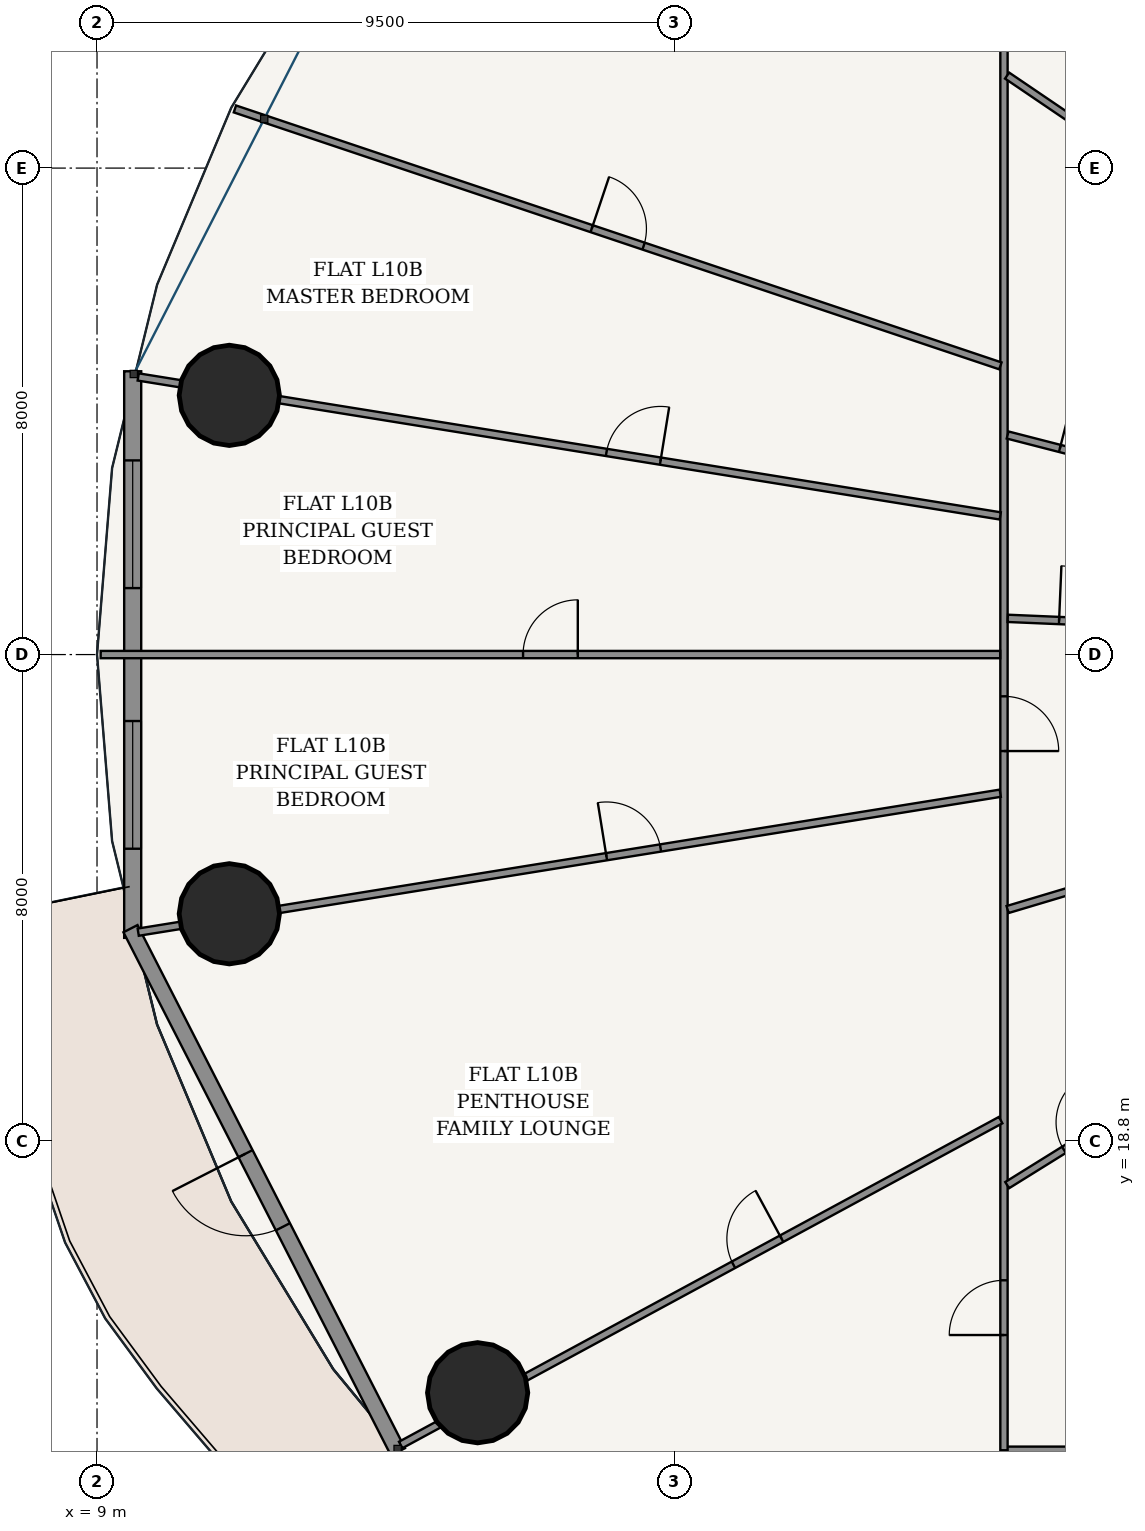
"""IFC4 building model, lengths in metres.
Left out: names, types, materials, properties, quantities, classifications, styles, units other than length and angle.
Written with IfcOpenShell. Run it as: python <this file> out.ifc"""

import sys

from ifc_helpers import new_model, si_unit, direction, frame, frame_2d, origin, origin_2d, place, context, subcontext, project, spatial, rectangle, hollow_circle, extrude, source, transform, mapped, element, fill, save


model = new_model("IFC4")
c1 = context("Model", 3, precision=1e-05, world=origin(), true_north=direction((-0.2419218956, 0.970295726276)))
c2 = subcontext(c1, "Body", "Model", "MODEL_VIEW")
j1 = project(units=[si_unit("LENGTHUNIT", "METRE"), si_unit("PLANEANGLEUNIT", "RADIAN")], contexts=[c1])
p1 = place(None, origin())
s1 = spatial("IfcSite", under=j1, at=p1, CompositionType="ELEMENT")
p2 = place(p1, origin())
s2 = spatial("IfcBuilding", under=s1, at=p2, CompositionType="ELEMENT")
p3 = place(p2, frame((0.0, 0.0, 42.0)))
s3 = spatial("IfcBuildingStorey", under=s2, at=p3, CompositionType="ELEMENT", Elevation=42.0)
for number, where, z_axis, x_axis in (
    (1, (11.176, 31.063, 0.0), (0.0, 0.0, 1.0), (1.0, 0.0, 0.0)),
    (2, (11.176, 22.537, 0.0), (0.0, 0.0, 1.0), (1.0, 0.0, 0.0)),
    (3, (15.259, 14.661, 0.0), (0.0, 0.0, 1.0), (1.0, 0.0, 0.0)),
):
    element("IfcColumn", number, at=place(p3, frame(where, z_axis=z_axis, x_axis=x_axis)), inside=s3, PredefinedType="COLUMN", context=c2, shape_type="SweptSolid", body=[
        extrude(hollow_circle(Radius=0.825, WallThickness=0.05, at=origin_2d()), origin(), (0.0, 0.0, 1.0), 3.6),
    ])
p4 = place(p3, frame((9.587, 31.459, 0.0), z_axis=(0.0, 0.0, 1.0), x_axis=(0.0, -1.0, 0.0)))
e4 = element("IfcWall", 4, at=p4, inside=s3, PredefinedType="SOLIDWALL", context=c2, shape_type="SweptSolid", body=[
    extrude(rectangle(XDim=9.318, YDim=0.28, at=frame_2d((4.659, 0.0))), origin(), (0.0, 0.0, 1.0), 3.32),
])
p5 = place(p4, frame((1.466, 0.0, 0.85)))
e5 = element("IfcOpeningElement", 5, at=p5, cuts=e4, PredefinedType="OPENING", context=c2, shape_type="SweptSolid", body=[
    extrude(rectangle(XDim=2.1, YDim=1.95, at=frame_2d((1.05, 0.975))), frame((0.0, 0.15, 0.0), z_axis=(0.0, -1.0, 0.0), x_axis=(1.0, 0.0, 0.0)), (0.0, 0.0, 1.0), 0.3),
])
p6 = place(p4, frame((5.752, 0.0, 0.85)))
e6 = element("IfcOpeningElement", 6, at=p6, cuts=e4, PredefinedType="OPENING", context=c2, shape_type="SweptSolid", body=[
    extrude(rectangle(XDim=2.1, YDim=1.95, at=frame_2d((1.05, 0.975))), frame((0.0, 0.15, 0.0), z_axis=(0.0, -1.0, 0.0), x_axis=(1.0, 0.0, 0.0)), (0.0, 0.0, 1.0), 0.3),
])
p7 = place(p3, frame((9.55, 22.292, 0.0), z_axis=(0.0, 0.0, 1.0), x_axis=(0.455220575541, -0.890378698984, 0.0)))
e7 = element("IfcWall", 7, at=p7, inside=s3, PredefinedType="SOLIDWALL", context=c2, shape_type="SweptSolid", body=[
    extrude(rectangle(XDim=9.662, YDim=0.26, at=frame_2d((4.831, 0.0))), origin(), (0.0, 0.0, 1.0), 3.32),
])
p8 = place(p7, frame((4.156, 0.0, 0.0)))
e8 = element("IfcOpeningElement", 8, at=p8, cuts=e7, PredefinedType="OPENING", context=c2, shape_type="SweptSolid", body=[
    extrude(rectangle(XDim=1.35, YDim=2.2, at=frame_2d((0.675, 1.1))), frame((0.0, 0.14, 0.0), z_axis=(0.0, -1.0, 0.0), x_axis=(1.0, 0.0, 0.0)), (0.0, 0.0, 1.0), 0.28),
])
p9 = place(p3, frame((27.109, 13.715, 0.0), z_axis=(0.0, 0.0, 1.0), x_axis=(-1.0, 0.0, 0.0)))
e9 = element("IfcWall", 9, at=p9, inside=s3, PredefinedType="PARTITIONING", context=c2, shape_type="SweptSolid", body=[
    extrude(rectangle(XDim=3.194, YDim=0.12, at=frame_2d((1.597, 0.0))), origin(), (0.0, 0.0, 1.0), 2.688),
])
p10 = place(p3, frame((23.915, 13.715, 0.0), z_axis=(0.0, 0.0, 1.0), x_axis=(0.0, 1.0, 0.0)))
e10 = element("IfcWall", 10, at=p10, inside=s3, PredefinedType="PARTITIONING", context=c2, shape_type="SweptSolid", body=[
    extrude(rectangle(XDim=26.17, YDim=0.12, at=frame_2d((13.085, 0.0))), origin(), (0.0, 0.0, 1.0), 2.688),
])
p11 = place(p10, frame((1.895, 0.0, 0.0)))
e11 = element("IfcOpeningElement", 11, at=p11, cuts=e10, PredefinedType="OPENING", context=c2, shape_type="SweptSolid", body=[
    extrude(rectangle(XDim=0.9, YDim=2.15, at=frame_2d((0.45, 1.075))), frame((0.0, 0.07, 0.0), z_axis=(0.0, -1.0, 0.0), x_axis=(1.0, 0.0, 0.0)), (0.0, 0.0, 1.0), 0.14),
])
p12 = place(p10, frame((11.498, 0.0, 0.0)))
e12 = element("IfcOpeningElement", 12, at=p12, cuts=e10, PredefinedType="OPENING", context=c2, shape_type="SweptSolid", body=[
    extrude(rectangle(XDim=0.9, YDim=2.15, at=frame_2d((0.45, 1.075))), frame((0.0, 0.07, 0.0), z_axis=(0.0, -1.0, 0.0), x_axis=(1.0, 0.0, 0.0)), (0.0, 0.0, 1.0), 0.14),
])
p13 = place(p10, frame((23.831, 0.0, 0.0)))
e13 = element("IfcOpeningElement", 13, at=p13, cuts=e10, PredefinedType="OPENING", context=c2, shape_type="SweptSolid", body=[
    extrude(rectangle(XDim=0.86, YDim=2.15, at=frame_2d((0.43, 1.075))), frame((0.0, 0.07, 0.0), z_axis=(0.0, -1.0, 0.0), x_axis=(1.0, 0.0, 0.0)), (0.0, 0.0, 1.0), 0.14),
])
p14 = place(p3, frame((23.856, 31.547, 0.0), z_axis=(0.0, 0.0, 1.0), x_axis=(-0.948017487737, 0.318218231634, 0.0)))
e14 = element("IfcWall", 14, at=p14, inside=s3, PredefinedType="PARTITIONING", context=c2, shape_type="SweptSolid", body=[
    extrude(rectangle(XDim=13.279, YDim=0.12, at=frame_2d((6.639, 0.0))), origin(), (0.0, 0.0, 1.0), 2.762),
])
p15 = place(p14, frame((6.189, 0.0, 0.0)))
e15 = element("IfcOpeningElement", 15, at=p15, cuts=e14, PredefinedType="OPENING", context=c2, shape_type="SweptSolid", body=[
    extrude(rectangle(XDim=0.9, YDim=2.15, at=frame_2d((0.45, 1.075))), frame((0.0, 0.07, 0.0), z_axis=(0.0, -1.0, 0.0), x_axis=(1.0, 0.0, 0.0)), (0.0, 0.0, 1.0), 0.14),
])
p16 = place(p3, frame((23.854, 29.08, 0.0), z_axis=(0.0, 0.0, 1.0), x_axis=(-0.987255773689, 0.159141563768, 0.0)))
e16 = element("IfcWall", 16, at=p16, inside=s3, PredefinedType="PARTITIONING", context=c2, shape_type="SweptSolid", body=[
    extrude(rectangle(XDim=14.359, YDim=0.12, at=frame_2d((7.18, 0.0))), origin(), (0.0, 0.0, 1.0), 2.688),
])
p17 = place(p16, frame((5.66, 0.0, 0.0)))
e17 = element("IfcOpeningElement", 17, at=p17, cuts=e16, PredefinedType="OPENING", context=c2, shape_type="SweptSolid", body=[
    extrude(rectangle(XDim=0.9, YDim=2.15, at=frame_2d((0.45, 1.075))), frame((0.0, 0.07, 0.0), z_axis=(0.0, -1.0, 0.0), x_axis=(1.0, 0.0, 0.0)), (0.0, 0.0, 1.0), 0.14),
])
p18 = place(p3, frame((23.853, 26.8, 0.0), z_axis=(0.0, 0.0, 1.0), x_axis=(-1.0, 0.0, 0.0)))
e18 = element("IfcWall", 18, at=p18, inside=s3, PredefinedType="PARTITIONING", context=c2, shape_type="SweptSolid", body=[
    extrude(rectangle(XDim=14.793, YDim=0.12, at=frame_2d((7.396, 0.0))), origin(), (0.0, 0.0, 1.0), 2.762),
])
p19 = place(p18, frame((6.947, 0.0, 0.0)))
e19 = element("IfcOpeningElement", 19, at=p19, cuts=e18, PredefinedType="OPENING", context=c2, shape_type="SweptSolid", body=[
    extrude(rectangle(XDim=0.9, YDim=2.15, at=frame_2d((0.45, 1.075))), frame((0.0, 0.07, 0.0), z_axis=(0.0, -1.0, 0.0), x_axis=(1.0, 0.0, 0.0)), (0.0, 0.0, 1.0), 0.14),
])
p20 = place(p3, frame((23.854, 24.52, 0.0), z_axis=(0.0, 0.0, 1.0), x_axis=(-0.987258444847, -0.159124991997, 0.0)))
e20 = element("IfcWall", 20, at=p20, inside=s3, PredefinedType="PARTITIONING", context=c2, shape_type="SweptSolid", body=[
    extrude(rectangle(XDim=14.359, YDim=0.12, at=frame_2d((7.18, 0.0))), origin(), (0.0, 0.0, 1.0), 2.688),
])
p21 = place(p20, frame((5.659, 0.0, 0.0)))
e21 = element("IfcOpeningElement", 21, at=p21, cuts=e20, PredefinedType="OPENING", context=c2, shape_type="SweptSolid", body=[
    extrude(rectangle(XDim=0.9, YDim=2.15, at=frame_2d((0.45, 1.075))), frame((0.0, 0.07, 0.0), z_axis=(0.0, -1.0, 0.0), x_axis=(1.0, 0.0, 0.0)), (0.0, 0.0, 1.0), 0.14),
])
p22 = place(p3, frame((23.861, 19.144, 0.0), z_axis=(0.0, 0.0, 1.0), x_axis=(-0.879372452045, -0.476134529922, 0.0)))
e22 = element("IfcWall", 22, at=p22, inside=s3, PredefinedType="PARTITIONING", context=c2, shape_type="SweptSolid", body=[
    extrude(rectangle(XDim=11.219, YDim=0.12, at=frame_2d((5.61, 0.0))), origin(), (0.0, 0.0, 1.0), 2.688),
])
p23 = place(p22, frame((4.097, 0.0, 0.0)))
e23 = element("IfcOpeningElement", 23, at=p23, cuts=e22, PredefinedType="OPENING", context=c2, shape_type="SweptSolid", body=[
    extrude(rectangle(XDim=0.9, YDim=2.15, at=frame_2d((0.45, 1.075))), frame((0.0, 0.07, 0.0), z_axis=(0.0, -1.0, 0.0), x_axis=(1.0, 0.0, 0.0)), (0.0, 0.0, 1.0), 0.14),
])
p24 = place(p3, frame((26.565, 34.558, 0.0), z_axis=(0.0, 0.0, 1.0), x_axis=(-0.827501574847, 0.561463394734, 0.0)))
e24 = element("IfcWall", 24, at=p24, inside=s3, PredefinedType="PARTITIONING", context=c2, shape_type="SweptSolid", body=[
    extrude(rectangle(XDim=3.14, YDim=0.12, at=frame_2d((1.57, 0.0))), origin(), (0.0, 0.0, 1.0), 3.32),
])
p25 = place(p3, frame((26.565, 29.744, 0.0), z_axis=(0.0, 0.0, 1.0), x_axis=(-0.968421803088, 0.249317490972, 0.0)))
e25 = element("IfcWall", 25, at=p25, inside=s3, PredefinedType="PARTITIONING", context=c2, shape_type="SweptSolid", body=[
    extrude(rectangle(XDim=2.674, YDim=0.12, at=frame_2d((1.337, 0.0))), origin(), (0.0, 0.0, 1.0), 3.32),
])
p26 = place(p25, frame((0.887, 0.0, 0.0)))
e26 = element("IfcOpeningElement", 26, at=p26, cuts=e25, PredefinedType="OPENING", context=c2, shape_type="SweptSolid", body=[
    extrude(rectangle(XDim=0.9, YDim=2.15, at=frame_2d((0.45, 1.075))), frame((0.0, 0.07, 0.0), z_axis=(0.0, -1.0, 0.0), x_axis=(1.0, 0.0, 0.0)), (0.0, 0.0, 1.0), 0.14),
])
p27 = place(p3, frame((26.565, 27.286, 0.0), z_axis=(0.0, 0.0, 1.0), x_axis=(-0.999100094808, 0.042414626666, 0.0)))
e27 = element("IfcWall", 27, at=p27, inside=s3, PredefinedType="PARTITIONING", context=c2, shape_type="SweptSolid", body=[
    extrude(rectangle(XDim=2.59, YDim=0.12, at=frame_2d((1.295, 0.0))), origin(), (0.0, 0.0, 1.0), 3.32),
])
p28 = place(p27, frame((0.845, 0.0, 0.0)))
e28 = element("IfcOpeningElement", 28, at=p28, cuts=e27, PredefinedType="OPENING", context=c2, shape_type="SweptSolid", body=[
    extrude(rectangle(XDim=0.9, YDim=2.15, at=frame_2d((0.45, 1.075))), frame((0.0, 0.07, 0.0), z_axis=(0.0, -1.0, 0.0), x_axis=(1.0, 0.0, 0.0)), (0.0, 0.0, 1.0), 0.14),
])
p29 = place(p3, frame((26.565, 23.382, 0.0), z_axis=(0.0, 0.0, 1.0), x_axis=(-0.958081868855, -0.286494559408, 0.0)))
e29 = element("IfcWall", 29, at=p29, inside=s3, PredefinedType="PARTITIONING", context=c2, shape_type="SweptSolid", body=[
    extrude(rectangle(XDim=2.704, YDim=0.12, at=frame_2d((1.352, 0.0))), origin(), (0.0, 0.0, 1.0), 3.32),
])
p30 = place(p3, frame((26.565, 19.69, 0.0), z_axis=(0.0, 0.0, 1.0), x_axis=(-0.849229217796, -0.52802437031, 0.0)))
e30 = element("IfcWall", 30, at=p30, inside=s3, PredefinedType="PARTITIONING", context=c2, shape_type="SweptSolid", body=[
    extrude(rectangle(XDim=3.059, YDim=0.12, at=frame_2d((1.529, 0.0))), origin(), (0.0, 0.0, 1.0), 3.32),
])
p31 = place(p30, frame((1.099, 0.0, 0.0)))
e31 = element("IfcOpeningElement", 31, at=p31, cuts=e30, PredefinedType="OPENING", context=c2, shape_type="SweptSolid", body=[
    extrude(rectangle(XDim=0.86, YDim=2.15, at=frame_2d((0.43, 1.075))), frame((0.0, 0.07, 0.0), z_axis=(0.0, -1.0, 0.0), x_axis=(1.0, 0.0, 0.0)), (0.0, 0.0, 1.0), 0.14),
])
p32 = place(p3, frame((29.396, 16.365, 0.0), z_axis=(0.0, 0.0, 1.0), x_axis=(-0.636186165667, -0.771535587393, 0.0)))
e32 = element("IfcWall", 32, at=p32, inside=s3, PredefinedType="PARTITIONING", context=c2, shape_type="SweptSolid", body=[
    extrude(rectangle(XDim=11.683, YDim=0.2, at=frame_2d((5.842, 0.0))), origin(), (0.0, 0.0, 1.0), 2.688),
])
m1 = source(origin(), c2, "Body", "SweptSolid", [
    extrude(rectangle(XDim=2.1, YDim=1.95, at=frame_2d((1.05, 0.975))), frame((0.0, 0.03, 0.0), z_axis=(0.0, -1.0, 0.0), x_axis=(1.0, 0.0, 0.0)), (0.0, 0.0, 1.0), 0.06),
])
p33 = place(p5, origin())
e33 = element("IfcWindow", 33, at=p33, inside=s3, PartitioningType="SINGLE_PANEL", PredefinedType="WINDOW", context=c2, shape_type="MappedRepresentation", body=[
    mapped(m1, transform((0.0, 0.0, 0.0), scale=1.0)),
])
fill(e5, e33)
p34 = place(p6, origin())
e34 = element("IfcWindow", 34, at=p34, inside=s3, PartitioningType="SINGLE_PANEL", PredefinedType="WINDOW", context=c2, shape_type="MappedRepresentation", body=[
    mapped(m1, transform((0.0, 0.0, 0.0), scale=1.0)),
])
fill(e6, e34)
m2 = source(origin(), c2, "Body", "SweptSolid", [
    extrude(rectangle(XDim=1.35, YDim=2.2, at=frame_2d((0.675, 1.1))), frame((0.0, 0.025, 0.0), z_axis=(0.0, -1.0, 0.0), x_axis=(1.0, 0.0, 0.0)), (0.0, 0.0, 1.0), 0.05),
])
p35 = place(p8, frame((1.35, 0.0, 0.0), z_axis=(0.0, 0.0, 1.0), x_axis=(-1.0, 0.0, 0.0)))
e35 = element("IfcDoor", 35, at=p35, inside=s3, OperationType="SINGLE_SWING_RIGHT", PredefinedType="DOOR", context=c2, shape_type="MappedRepresentation", body=[
    mapped(m2, transform((0.0, 0.0, 0.0), scale=1.0)),
])
fill(e8, e35)
m3 = source(origin(), c2, "Body", "SweptSolid", [
    extrude(rectangle(XDim=0.86, YDim=2.15, at=frame_2d((0.43, 1.075))), frame((0.0, 0.025, 0.0), z_axis=(0.0, -1.0, 0.0), x_axis=(1.0, 0.0, 0.0)), (0.0, 0.0, 1.0), 0.05),
])
p36 = place(p31, frame((0.86, 0.0, 0.0), z_axis=(0.0, 0.0, 1.0), x_axis=(-1.0, 0.0, 0.0)))
e36 = element("IfcDoor", 36, at=p36, inside=s3, OperationType="SINGLE_SWING_RIGHT", PredefinedType="DOOR", context=c2, shape_type="MappedRepresentation", body=[
    mapped(m3, transform((0.0, 0.0, 0.0), scale=1.0)),
])
fill(e31, e36)
m4 = source(origin(), c2, "Body", "SweptSolid", [
    extrude(rectangle(XDim=0.9, YDim=2.15, at=frame_2d((0.45, 1.075))), frame((0.0, 0.025, 0.0), z_axis=(0.0, -1.0, 0.0), x_axis=(1.0, 0.0, 0.0)), (0.0, 0.0, 1.0), 0.05),
])
p37 = place(p11, origin())
e37 = element("IfcDoor", 37, at=p37, inside=s3, OperationType="SINGLE_SWING_LEFT", PredefinedType="DOOR", context=c2, shape_type="MappedRepresentation", body=[
    mapped(m4, transform((0.0, 0.0, 0.0), scale=1.0)),
])
fill(e11, e37)
p38 = place(p23, frame((0.9, 0.0, 0.0), z_axis=(0.0, 0.0, 1.0), x_axis=(-1.0, 0.0, 0.0)))
e38 = element("IfcDoor", 38, at=p38, inside=s3, OperationType="SINGLE_SWING_RIGHT", PredefinedType="DOOR", context=c2, shape_type="MappedRepresentation", body=[
    mapped(m4, transform((0.0, 0.0, 0.0), scale=1.0)),
])
fill(e23, e38)
p39 = place(p21, frame((0.9, 0.0, 0.0), z_axis=(0.0, 0.0, 1.0), x_axis=(-1.0, 0.0, 0.0)))
e39 = element("IfcDoor", 39, at=p39, inside=s3, OperationType="SINGLE_SWING_LEFT", PredefinedType="DOOR", context=c2, shape_type="MappedRepresentation", body=[
    mapped(m4, transform((0.0, 0.0, 0.0), scale=1.0)),
])
fill(e21, e39)
p40 = place(p12, frame((0.9, 0.0, 0.0), z_axis=(0.0, 0.0, 1.0), x_axis=(-1.0, 0.0, 0.0)))
e40 = element("IfcDoor", 40, at=p40, inside=s3, OperationType="SINGLE_SWING_RIGHT", PredefinedType="DOOR", context=c2, shape_type="MappedRepresentation", body=[
    mapped(m4, transform((0.0, 0.0, 0.0), scale=1.0)),
])
fill(e12, e40)
p41 = place(p28, frame((0.9, 0.0, 0.0), z_axis=(0.0, 0.0, 1.0), x_axis=(-1.0, 0.0, 0.0)))
e41 = element("IfcDoor", 41, at=p41, inside=s3, OperationType="SINGLE_SWING_LEFT", PredefinedType="DOOR", context=c2, shape_type="MappedRepresentation", body=[
    mapped(m4, transform((0.0, 0.0, 0.0), scale=1.0)),
])
fill(e28, e41)
p42 = place(p19, frame((0.9, 0.0, 0.0), z_axis=(0.0, 0.0, 1.0), x_axis=(-1.0, 0.0, 0.0)))
e42 = element("IfcDoor", 42, at=p42, inside=s3, OperationType="SINGLE_SWING_RIGHT", PredefinedType="DOOR", context=c2, shape_type="MappedRepresentation", body=[
    mapped(m4, transform((0.0, 0.0, 0.0), scale=1.0)),
])
fill(e19, e42)
p43 = place(p26, frame((0.9, 0.0, 0.0), z_axis=(0.0, 0.0, 1.0), x_axis=(-1.0, 0.0, 0.0)))
e43 = element("IfcDoor", 43, at=p43, inside=s3, OperationType="SINGLE_SWING_LEFT", PredefinedType="DOOR", context=c2, shape_type="MappedRepresentation", body=[
    mapped(m4, transform((0.0, 0.0, 0.0), scale=1.0)),
])
fill(e26, e43)
p44 = place(p17, frame((0.9, 0.0, 0.0), z_axis=(0.0, 0.0, 1.0), x_axis=(-1.0, 0.0, 0.0)))
e44 = element("IfcDoor", 44, at=p44, inside=s3, OperationType="SINGLE_SWING_RIGHT", PredefinedType="DOOR", context=c2, shape_type="MappedRepresentation", body=[
    mapped(m4, transform((0.0, 0.0, 0.0), scale=1.0)),
])
fill(e17, e44)
p45 = place(p15, frame((0.9, 0.0, 0.0), z_axis=(0.0, 0.0, 1.0), x_axis=(-1.0, 0.0, 0.0)))
e45 = element("IfcDoor", 45, at=p45, inside=s3, OperationType="SINGLE_SWING_LEFT", PredefinedType="DOOR", context=c2, shape_type="MappedRepresentation", body=[
    mapped(m4, transform((0.0, 0.0, 0.0), scale=1.0)),
])
fill(e15, e45)
save(model, sys.argv[1])
